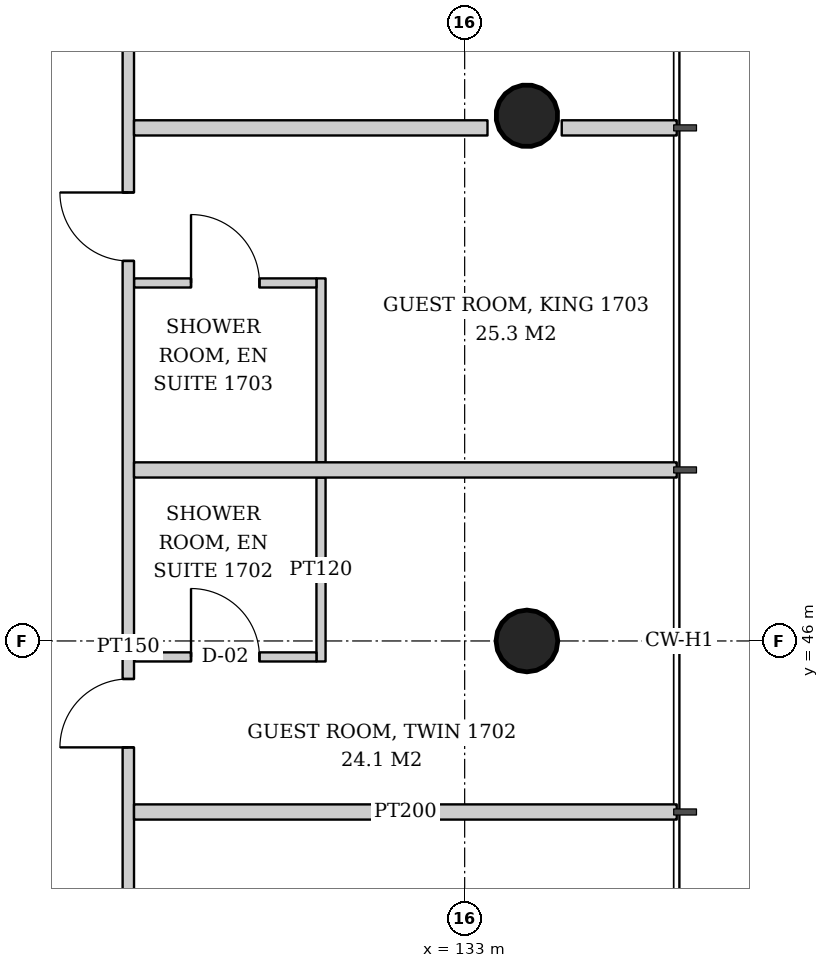
"""IFC4 building model, lengths in metres.
Left out: names, types, materials, properties, quantities, classifications, styles, units other than length and angle.
Written with IfcOpenShell. Run it as: python <this file> out.ifc"""

import sys

from ifc_helpers import new_model, si_unit, direction, frame, frame_2d, origin, origin_2d, place, context, subcontext, project, spatial, rectangle, hollow_circle, extrude, element, fill, save


model = new_model("IFC4")
c1 = context("Model", 3, precision=1e-05, world=origin(), true_north=direction((0.0, 1.0)))
c2 = subcontext(c1, "Body", "Model", "MODEL_VIEW")
j1 = project(units=[si_unit("LENGTHUNIT", "METRE"), si_unit("PLANEANGLEUNIT", "RADIAN")], contexts=[c1])
p1 = place(None, origin())
s1 = spatial("IfcSite", under=j1, at=p1, CompositionType="ELEMENT")
p2 = place(p1, origin())
s2 = spatial("IfcBuilding", under=s1, at=p2, CompositionType="ELEMENT")
p3 = place(p2, frame((0.0, 0.0, 70.4)))
s3 = spatial("IfcBuildingStorey", under=s2, at=p3, CompositionType="ELEMENT", Elevation=70.4)
p4 = place(p3, frame((133.871, 46.0, 0.0), z_axis=(-0.043069538298, 0.0, 0.999072076915), x_axis=(0.0, -1.0, 0.0)))
e1 = element("IfcColumn", 1, at=p4, inside=s3, PredefinedType="COLUMN", context=c2, shape_type="SweptSolid", body=[
    extrude(hollow_circle(Radius=0.406, WallThickness=0.03, at=origin_2d()), origin(), (0.0, 0.0, 1.0), 3.803),
])
p5 = place(p3, frame((133.871, 52.935, 0.0), z_axis=(-0.043059584825, -0.021497706284, 0.998841188968), x_axis=(0.446680166538, -0.894693706707, 0.0)))
e2 = element("IfcColumn", 2, at=p5, inside=s3, PredefinedType="COLUMN", context=c2, shape_type="SweptSolid", body=[
    extrude(hollow_circle(Radius=0.406, WallThickness=0.03, at=origin_2d()), origin(), (0.0, 0.0, 1.0), 3.804),
])
p6 = place(p3, frame((131.11, 45.73, 0.0), z_axis=(0.0, 0.0, 1.0), x_axis=(0.0, 1.0, 0.0)))
e3 = element("IfcWall", 3, at=p6, inside=s3, PredefinedType="PARTITIONING", context=c2, shape_type="SweptSolid", body=[
    extrude(rectangle(XDim=2.42, YDim=0.12, at=frame_2d((1.21, 0.0))), origin(), (0.0, 0.0, 1.0), 3.6),
])
p7 = place(p3, frame((128.65, 45.79, 0.0), z_axis=(0.0, 0.0, 1.0), x_axis=(1.0, 0.0, 0.0)))
e4 = element("IfcWall", 4, at=p7, inside=s3, PredefinedType="PARTITIONING", context=c2, shape_type="SweptSolid", body=[
    extrude(rectangle(XDim=2.4, YDim=0.12, at=frame_2d((1.2, 0.0))), origin(), (0.0, 0.0, 1.0), 3.6),
])
p8 = place(p7, frame((0.75, 0.0, 0.0)))
e5 = element("IfcOpeningElement", 5, at=p8, cuts=e4, PredefinedType="OPENING", context=c2, shape_type="SweptSolid", body=[
    extrude(rectangle(XDim=0.9, YDim=2.1, at=frame_2d((0.45, 1.05))), frame((0.0, 0.07, 0.0), z_axis=(0.0, -1.0, 0.0), x_axis=(1.0, 0.0, 0.0)), (0.0, 0.0, 1.0), 0.14),
])
p9 = place(p3, frame((131.11, 48.35, 0.0), z_axis=(0.0, 0.0, 1.0), x_axis=(0.0, 1.0, 0.0)))
e6 = element("IfcWall", 6, at=p9, inside=s3, PredefinedType="PARTITIONING", context=c2, shape_type="SweptSolid", body=[
    extrude(rectangle(XDim=2.42, YDim=0.12, at=frame_2d((1.21, 0.0))), origin(), (0.0, 0.0, 1.0), 2.847),
])
p10 = place(p3, frame((128.65, 50.71, 0.0), z_axis=(0.0, 0.0, 1.0), x_axis=(1.0, 0.0, 0.0)))
e7 = element("IfcWall", 7, at=p10, inside=s3, PredefinedType="PARTITIONING", context=c2, shape_type="SweptSolid", body=[
    extrude(rectangle(XDim=2.4, YDim=0.12, at=frame_2d((1.2, 0.0))), origin(), (0.0, 0.0, 1.0), 3.6),
])
p11 = place(p10, frame((0.75, 0.0, 0.0)))
e8 = element("IfcOpeningElement", 8, at=p11, cuts=e7, PredefinedType="OPENING", context=c2, shape_type="SweptSolid", body=[
    extrude(rectangle(XDim=0.9, YDim=2.1, at=frame_2d((0.45, 1.05))), frame((0.0, 0.07, 0.0), z_axis=(0.0, -1.0, 0.0), x_axis=(1.0, 0.0, 0.0)), (0.0, 0.0, 1.0), 0.14),
])
p12 = place(p3, frame((128.575, 34.35, 0.0), z_axis=(0.0, 0.0, 1.0), x_axis=(0.0, 1.0, 0.0)))
e9 = element("IfcWall", 9, at=p12, inside=s3, PredefinedType="PARTITIONING", context=c2, shape_type="SweptSolid", body=[
    extrude(rectangle(XDim=23.15, YDim=0.15, at=frame_2d((11.575, 0.0))), origin(), (0.0, 0.0, 1.0), 2.8),
])
p13 = place(p12, frame((2.025, 0.0, 0.0)))
e10 = element("IfcOpeningElement", 10, at=p13, cuts=e9, PredefinedType="OPENING", context=c2, shape_type="SweptSolid", body=[
    extrude(rectangle(XDim=0.9, YDim=2.1, at=frame_2d((0.45, 1.05))), frame((0.0, 0.085, 0.0), z_axis=(0.0, -1.0, 0.0), x_axis=(1.0, 0.0, 0.0)), (0.0, 0.0, 1.0), 0.17),
])
p14 = place(p12, frame((10.25, 0.0, 0.0)))
e11 = element("IfcOpeningElement", 11, at=p14, cuts=e9, PredefinedType="OPENING", context=c2, shape_type="SweptSolid", body=[
    extrude(rectangle(XDim=0.9, YDim=2.1, at=frame_2d((0.45, 1.05))), frame((0.0, 0.085, 0.0), z_axis=(0.0, -1.0, 0.0), x_axis=(1.0, 0.0, 0.0)), (0.0, 0.0, 1.0), 0.17),
])
p15 = place(p12, frame((16.65, 0.0, 0.0)))
e12 = element("IfcOpeningElement", 12, at=p15, cuts=e9, PredefinedType="OPENING", context=c2, shape_type="SweptSolid", body=[
    extrude(rectangle(XDim=0.9, YDim=2.1, at=frame_2d((0.45, 1.05))), frame((0.0, 0.085, 0.0), z_axis=(0.0, -1.0, 0.0), x_axis=(1.0, 0.0, 0.0)), (0.0, 0.0, 1.0), 0.17),
])
for number, where, z_axis, x_axis in (
    (13, (128.65, 43.75, 0.0), (0.0, 0.0, 1.0), (1.0, 0.0, 0.0)),
    (14, (128.65, 48.25, 0.0), (0.0, 0.0, 1.0), (1.0, 0.0, 0.0)),
):
    element("IfcWall", number, at=place(p3, frame(where, z_axis=z_axis, x_axis=x_axis)), inside=s3, PredefinedType="PARTITIONING", context=c2, shape_type="SweptSolid", body=[
        extrude(rectangle(XDim=7.14, YDim=0.2, at=frame_2d((3.57, 0.0))), origin(), (0.0, 0.0, 1.0), 3.05),
    ])
p16 = place(p3, frame((128.65, 52.75, 0.0), z_axis=(0.0, 0.0, 1.0), x_axis=(1.0, 0.0, 0.0)))
e15 = element("IfcWall", 15, at=p16, inside=s3, PredefinedType="PARTITIONING", context=c2, shape_type="SweptSolid", body=[
    extrude(rectangle(XDim=4.65, YDim=0.2, at=frame_2d((2.325, 0.0))), origin(), (0.0, 0.0, 1.0), 3.6),
])
p17 = place(p3, frame((134.277, 52.75, 0.0), z_axis=(0.0, 0.0, 1.0), x_axis=(1.0, 0.0, 0.0)))
e16 = element("IfcWall", 16, at=p17, inside=s3, PredefinedType="PARTITIONING", context=c2, shape_type="SweptSolid", body=[
    extrude(rectangle(XDim=1.513, YDim=0.2, at=frame_2d((0.756, 0.0))), origin(), (0.0, 0.0, 1.0), 3.6),
])
p18 = place(p8, origin())
e17 = element("IfcDoor", 17, at=p18, inside=s3, OperationType="SINGLE_SWING_LEFT", PredefinedType="DOOR", context=c2, shape_type="SweptSolid", body=[
    extrude(rectangle(XDim=0.9, YDim=2.1, at=frame_2d((0.45, 1.05))), frame((0.0, 0.025, 0.0), z_axis=(0.0, -1.0, 0.0), x_axis=(1.0, 0.0, 0.0)), (0.0, 0.0, 1.0), 0.05),
])
fill(e5, e17)
p19 = place(p11, origin())
e18 = element("IfcDoor", 18, at=p19, inside=s3, OperationType="SINGLE_SWING_LEFT", PredefinedType="DOOR", context=c2, shape_type="SweptSolid", body=[
    extrude(rectangle(XDim=0.9, YDim=2.1, at=frame_2d((0.45, 1.05))), frame((0.0, 0.025, 0.0), z_axis=(0.0, -1.0, 0.0), x_axis=(1.0, 0.0, 0.0)), (0.0, 0.0, 1.0), 0.05),
])
fill(e8, e18)
p20 = place(p14, origin())
e19 = element("IfcDoor", 19, at=p20, inside=s3, OperationType="SINGLE_SWING_LEFT", PredefinedType="DOOR", context=c2, shape_type="SweptSolid", body=[
    extrude(rectangle(XDim=0.9, YDim=2.1, at=frame_2d((0.45, 1.05))), frame((0.0, 0.025, 0.0), z_axis=(0.0, -1.0, 0.0), x_axis=(1.0, 0.0, 0.0)), (0.0, 0.0, 1.0), 0.05),
])
fill(e11, e19)
p21 = place(p15, origin())
e20 = element("IfcDoor", 20, at=p21, inside=s3, OperationType="SINGLE_SWING_RIGHT", PredefinedType="DOOR", context=c2, shape_type="SweptSolid", body=[
    extrude(rectangle(XDim=0.9, YDim=2.1, at=frame_2d((0.45, 1.05))), frame((0.0, 0.025, 0.0), z_axis=(0.0, -1.0, 0.0), x_axis=(1.0, 0.0, 0.0)), (0.0, 0.0, 1.0), 0.05),
])
fill(e12, e20)
save(model, sys.argv[1])
